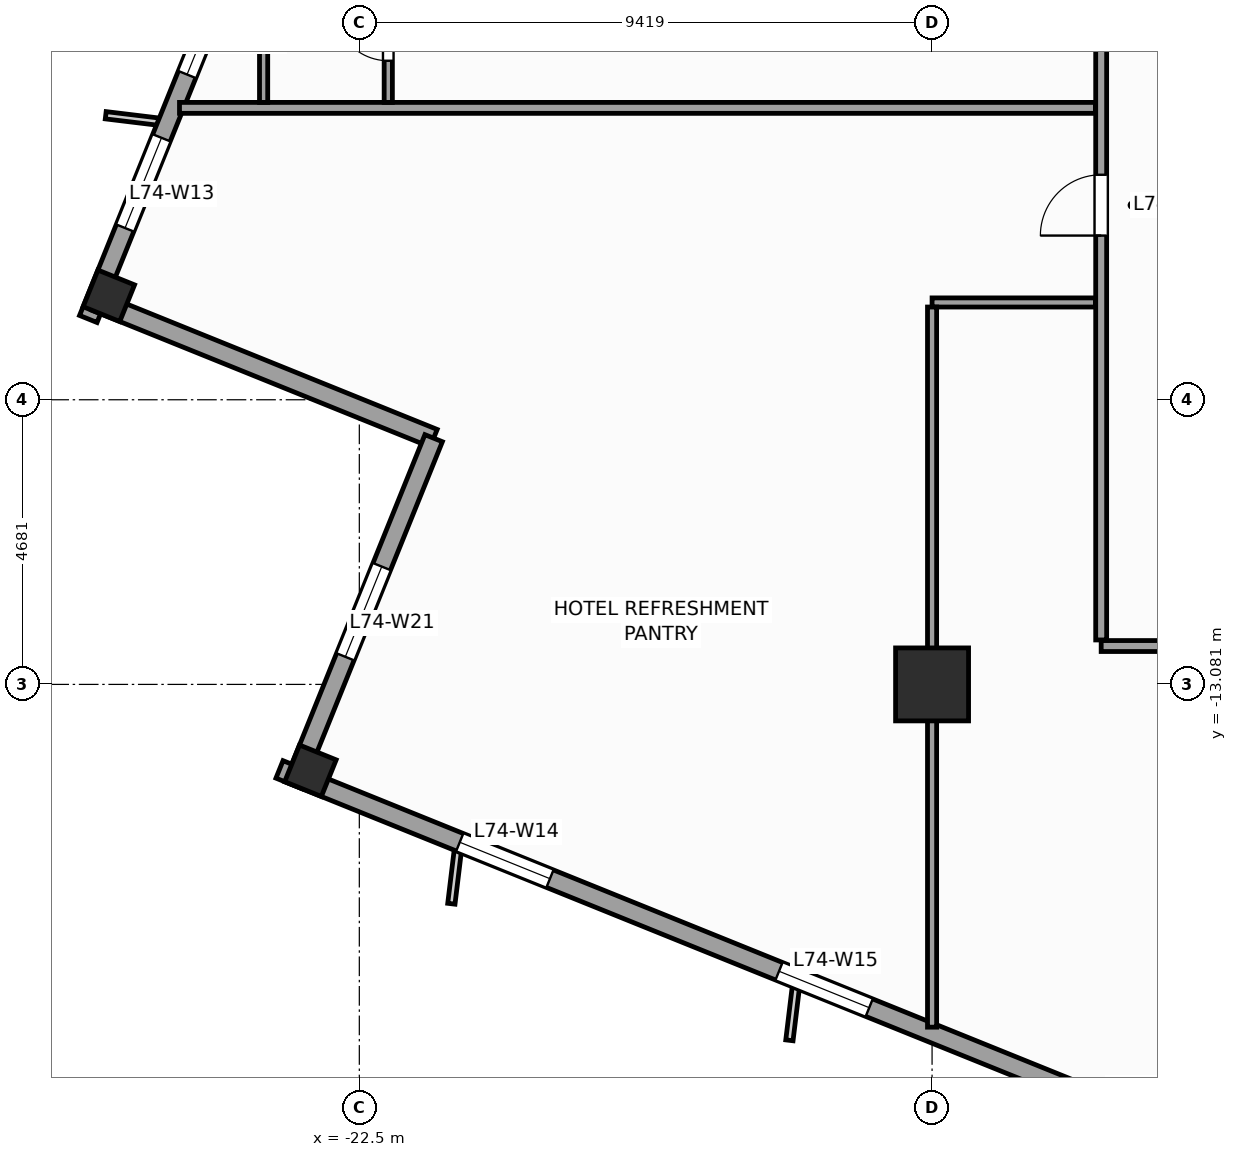
"""IFC4 building model, lengths in metres.
Left out: names, types, materials, properties, quantities, classifications, styles, units other than length and angle.
Written with IfcOpenShell. Run it as: python <this file> out.ifc"""

import sys

from ifc_helpers import new_model, si_unit, direction, frame, frame_2d, origin, origin_2d, place, context, subcontext, project, spatial, rectangle, extrude, source, transform, mapped, element, fill, save


model = new_model("IFC4")
c1 = context("Model", 3, precision=1e-05, world=origin(), true_north=direction((0.0, 1.0)))
c2 = subcontext(c1, "Body", "Model", "MODEL_VIEW")
j1 = project(units=[si_unit("LENGTHUNIT", "METRE"), si_unit("PLANEANGLEUNIT", "RADIAN")], contexts=[c1])
p1 = place(None, origin())
s1 = spatial("IfcSite", under=j1, at=p1, CompositionType="ELEMENT")
p2 = place(p1, origin())
s2 = spatial("IfcBuilding", under=s1, at=p2, CompositionType="ELEMENT")
p3 = place(p2, frame((0.0, 0.0, 301.2)))
s3 = spatial("IfcBuildingStorey", under=s2, at=p3, CompositionType="ELEMENT", Elevation=301.2)
m1 = source(origin(), c2, "Body", "SweptSolid", [
    extrude(rectangle(XDim=1.2, YDim=1.2, at=origin_2d()), origin(), (0.0, 0.0, 1.0), 3.6),
])
p4 = place(p3, frame((-13.081, -13.081, 0.0), z_axis=(0.0, 0.0, 1.0), x_axis=(1.0, 0.0, 0.0)))
e1 = element("IfcColumn", 1, at=p4, inside=s3, PredefinedType="COLUMN", context=c2, shape_type="MappedRepresentation", body=[
    mapped(m1, transform((0.0, 0.0, 0.0), scale=1.0)),
])
m2 = source(origin(), c2, "Body", "SweptSolid", [
    extrude(rectangle(XDim=0.65, YDim=0.65, at=origin_2d()), origin(), (0.0, 0.0, 1.0), 3.6),
])
for number, where, z_axis, x_axis in (
    (2, (-26.62, -6.69, 0.0), (0.0, 0.0, 1.0), (0.375, 0.927, 0.0)),
    (3, (-23.304, -14.501, 0.0), (0.0, 0.0, 1.0), (0.375, 0.927, 0.0)),
):
    element("IfcColumn", number, at=place(p3, frame(where, z_axis=z_axis, x_axis=x_axis)), inside=s3, PredefinedType="COLUMN", context=c2, shape_type="MappedRepresentation", body=[
        mapped(m2, transform((0.0, 0.0, 0.0), scale=1.0)),
    ])
p5 = place(p3, frame((-14.479, 23.813, 0.0), z_axis=(0.0, 0.0, 1.0), x_axis=(-0.374609557019, -0.927182657188, 0.0)))
e4 = element("IfcWall", 4, at=p5, inside=s3, PredefinedType="STANDARD", context=c2, shape_type="SweptSolid", body=[
    extrude(rectangle(XDim=33.31, YDim=0.31, at=frame_2d((16.655, 0.0))), origin(), (0.0, 0.0, 1.0), 2.75),
])
p6 = place(p5, frame((21.73, 0.0, 0.0)))
e5 = element("IfcOpeningElement", 5, at=p6, cuts=e4, PredefinedType="OPENING", context=c2, shape_type="SweptSolid", body=[
    extrude(rectangle(XDim=1.05, YDim=2.25, at=frame_2d((0.525, 1.125))), frame((0.0, 0.165, 0.0), z_axis=(0.0, -1.0, 0.0), x_axis=(1.0, 0.0, 0.0)), (0.0, 0.0, 1.0), 0.33),
])
p7 = place(p5, frame((3.197, 0.0, 0.47)))
e6 = element("IfcOpeningElement", 6, at=p7, cuts=e4, PredefinedType="OPENING", context=c2, shape_type="SweptSolid", body=[
    extrude(rectangle(XDim=1.6, YDim=2.1, at=frame_2d((0.8, 1.05))), frame((0.0, 0.165, 0.0), z_axis=(0.0, -1.0, 0.0), x_axis=(1.0, 0.0, 0.0)), (0.0, 0.0, 1.0), 0.33),
])
p8 = place(p5, frame((8.86, 0.0, 0.47)))
e7 = element("IfcOpeningElement", 7, at=p8, cuts=e4, PredefinedType="OPENING", context=c2, shape_type="SweptSolid", body=[
    extrude(rectangle(XDim=1.6, YDim=2.1, at=frame_2d((0.8, 1.05))), frame((0.0, 0.165, 0.0), z_axis=(0.0, -1.0, 0.0), x_axis=(1.0, 0.0, 0.0)), (0.0, 0.0, 1.0), 0.33),
])
p9 = place(p5, frame((14.439, 0.0, 0.47)))
e8 = element("IfcOpeningElement", 8, at=p9, cuts=e4, PredefinedType="OPENING", context=c2, shape_type="SweptSolid", body=[
    extrude(rectangle(XDim=1.6, YDim=2.1, at=frame_2d((0.8, 1.05))), frame((0.0, 0.165, 0.0), z_axis=(0.0, -1.0, 0.0), x_axis=(1.0, 0.0, 0.0)), (0.0, 0.0, 1.0), 0.33),
])
p10 = place(p5, frame((30.097, 0.0, 0.47)))
e9 = element("IfcOpeningElement", 9, at=p10, cuts=e4, PredefinedType="OPENING", context=c2, shape_type="SweptSolid", body=[
    extrude(rectangle(XDim=1.6, YDim=2.1, at=frame_2d((0.8, 1.05))), frame((0.0, 0.165, 0.0), z_axis=(0.0, -1.0, 0.0), x_axis=(1.0, 0.0, 0.0)), (0.0, 0.0, 1.0), 0.33),
])
p11 = place(p5, frame((27.374, 0.0, 0.47)))
e10 = element("IfcOpeningElement", 10, at=p11, cuts=e4, PredefinedType="OPENING", context=c2, shape_type="SweptSolid", body=[
    extrude(rectangle(XDim=1.6, YDim=2.1, at=frame_2d((0.8, 1.05))), frame((0.0, 0.165, 0.0), z_axis=(0.0, -1.0, 0.0), x_axis=(1.0, 0.0, 0.0)), (0.0, 0.0, 1.0), 0.33),
])
p12 = place(p3, frame((-26.841, -6.784, 0.0), z_axis=(0.0, 0.0, 1.0), x_axis=(0.927171722085, -0.374636620962, 0.0)))
e11 = element("IfcWall", 11, at=p12, inside=s3, PredefinedType="STANDARD", context=c2, shape_type="SweptSolid", body=[
    extrude(rectangle(XDim=6.0, YDim=0.31, at=frame_2d((3.0, 0.0))), origin(), (0.0, 0.0, 1.0), 2.65),
])
p13 = place(p3, frame((-21.278, -9.032, 0.0), z_axis=(0.0, 0.0, 1.0), x_axis=(-0.374602739196, -0.927185411764, 0.0)))
e12 = element("IfcWall", 12, at=p13, inside=s3, PredefinedType="STANDARD", context=c2, shape_type="SweptSolid", body=[
    extrude(rectangle(XDim=6.155, YDim=0.31, at=frame_2d((3.078, 0.0))), origin(), (0.0, 0.0, 1.0), 3.35),
])
p14 = place(p13, frame((2.278, 0.0, 0.47)))
e13 = element("IfcOpeningElement", 13, at=p14, cuts=e12, PredefinedType="OPENING", context=c2, shape_type="SweptSolid", body=[
    extrude(rectangle(XDim=1.6, YDim=2.1, at=frame_2d((0.8, 1.05))), frame((0.0, 0.165, 0.0), z_axis=(0.0, -1.0, 0.0), x_axis=(1.0, 0.0, 0.0)), (0.0, 0.0, 1.0), 0.33),
])
p15 = place(p3, frame((-23.813, -14.479, 0.0), z_axis=(0.0, 0.0, 1.0), x_axis=(0.927182657188, -0.374609557019, 0.0)))
e14 = element("IfcWall", 14, at=p15, inside=s3, PredefinedType="STANDARD", context=c2, shape_type="SweptSolid", body=[
    extrude(rectangle(XDim=33.31, YDim=0.31, at=frame_2d((16.655, 0.0))), origin(), (0.0, 0.0, 1.0), 2.75),
])
p16 = place(p15, frame((3.197, 0.0, 0.47)))
e15 = element("IfcOpeningElement", 15, at=p16, cuts=e14, PredefinedType="OPENING", context=c2, shape_type="SweptSolid", body=[
    extrude(rectangle(XDim=1.6, YDim=2.1, at=frame_2d((0.8, 1.05))), frame((0.0, 0.165, 0.0), z_axis=(0.0, -1.0, 0.0), x_axis=(1.0, 0.0, 0.0)), (0.0, 0.0, 1.0), 0.33),
])
p17 = place(p15, frame((8.86, 0.0, 0.47)))
e16 = element("IfcOpeningElement", 16, at=p17, cuts=e14, PredefinedType="OPENING", context=c2, shape_type="SweptSolid", body=[
    extrude(rectangle(XDim=1.6, YDim=2.1, at=frame_2d((0.8, 1.05))), frame((0.0, 0.165, 0.0), z_axis=(0.0, -1.0, 0.0), x_axis=(1.0, 0.0, 0.0)), (0.0, 0.0, 1.0), 0.33),
])
p18 = place(p15, frame((14.439, 0.0, 0.47)))
e17 = element("IfcOpeningElement", 17, at=p18, cuts=e14, PredefinedType="OPENING", context=c2, shape_type="SweptSolid", body=[
    extrude(rectangle(XDim=1.6, YDim=2.1, at=frame_2d((0.8, 1.05))), frame((0.0, 0.165, 0.0), z_axis=(0.0, -1.0, 0.0), x_axis=(1.0, 0.0, 0.0)), (0.0, 0.0, 1.0), 0.33),
])
p19 = place(p15, frame((22.601, 0.0, 0.47)))
e18 = element("IfcOpeningElement", 18, at=p19, cuts=e14, PredefinedType="OPENING", context=c2, shape_type="SweptSolid", body=[
    extrude(rectangle(XDim=1.6, YDim=2.1, at=frame_2d((0.8, 1.05))), frame((0.0, 0.165, 0.0), z_axis=(0.0, -1.0, 0.0), x_axis=(1.0, 0.0, 0.0)), (0.0, 0.0, 1.0), 0.33),
])
p20 = place(p15, frame((27.097, 0.0, 0.47)))
e19 = element("IfcOpeningElement", 19, at=p20, cuts=e14, PredefinedType="OPENING", context=c2, shape_type="SweptSolid", body=[
    extrude(rectangle(XDim=1.6, YDim=2.1, at=frame_2d((0.8, 1.05))), frame((0.0, 0.165, 0.0), z_axis=(0.0, -1.0, 0.0), x_axis=(1.0, 0.0, 0.0)), (0.0, 0.0, 1.0), 0.33),
])
p21 = place(p3, frame((-10.3, -12.45, 0.0), z_axis=(0.0, 0.0, 1.0), x_axis=(1.0, 0.0, 0.0)))
e20 = element("IfcWall", 20, at=p21, inside=s3, PredefinedType="PARTITIONING", context=c2, shape_type="SweptSolid", body=[
    extrude(rectangle(XDim=21.65, YDim=0.18, at=frame_2d((10.825, 0.0))), origin(), (0.0, 0.0, 1.0), 3.35),
])
p22 = place(p21, frame((14.786, 0.0, 0.0)))
e21 = element("IfcOpeningElement", 21, at=p22, cuts=e20, PredefinedType="OPENING", context=c2, shape_type="SweptSolid", body=[
    extrude(rectangle(XDim=0.95, YDim=2.1, at=frame_2d((0.475, 1.05))), frame((0.0, 0.1, 0.0), z_axis=(0.0, -1.0, 0.0), x_axis=(1.0, 0.0, 0.0)), (0.0, 0.0, 1.0), 0.2),
])
p23 = place(p21, frame((9.8, 0.0, 0.0)))
e22 = element("IfcOpeningElement", 22, at=p23, cuts=e20, PredefinedType="OPENING", context=c2, shape_type="SweptSolid", body=[
    extrude(rectangle(XDim=1.0, YDim=2.15, at=frame_2d((0.5, 1.075))), frame((0.0, 0.1, 0.0), z_axis=(0.0, -1.0, 0.0), x_axis=(1.0, 0.0, 0.0)), (0.0, 0.0, 1.0), 0.2),
])
p24 = place(p21, frame((3.064, 0.0, 0.0)))
e23 = element("IfcOpeningElement", 23, at=p24, cuts=e20, PredefinedType="OPENING", context=c2, shape_type="SweptSolid", body=[
    extrude(rectangle(XDim=1.0, YDim=2.15, at=frame_2d((0.5, 1.075))), frame((0.0, 0.1, 0.0), z_axis=(0.0, -1.0, 0.0), x_axis=(1.0, 0.0, 0.0)), (0.0, 0.0, 1.0), 0.2),
])
p25 = place(p3, frame((-10.3, -12.35, 0.0), z_axis=(0.0, 0.0, 1.0), x_axis=(0.0, 1.0, 0.0)))
e24 = element("IfcWall", 24, at=p25, inside=s3, PredefinedType="PARTITIONING", context=c2, shape_type="SweptSolid", body=[
    extrude(rectangle(XDim=22.55, YDim=0.18, at=frame_2d((11.275, 0.0))), origin(), (0.0, 0.0, 1.0), 3.35),
])
p26 = place(p25, frame((13.95, 0.0, 0.0)))
e25 = element("IfcOpeningElement", 25, at=p26, cuts=e24, PredefinedType="OPENING", context=c2, shape_type="SweptSolid", body=[
    extrude(rectangle(XDim=1.0, YDim=2.15, at=frame_2d((0.5, 1.075))), frame((0.0, 0.1, 0.0), z_axis=(0.0, -1.0, 0.0), x_axis=(1.0, 0.0, 0.0)), (0.0, 0.0, 1.0), 0.2),
])
p27 = place(p25, frame((17.25, 0.0, 0.0)))
e26 = element("IfcOpeningElement", 26, at=p27, cuts=e24, PredefinedType="OPENING", context=c2, shape_type="SweptSolid", body=[
    extrude(rectangle(XDim=1.0, YDim=2.15, at=frame_2d((0.5, 1.075))), frame((0.0, 0.1, 0.0), z_axis=(0.0, -1.0, 0.0), x_axis=(1.0, 0.0, 0.0)), (0.0, 0.0, 1.0), 0.2),
])
p28 = place(p25, frame((6.65, 0.0, 0.0)))
e27 = element("IfcOpeningElement", 27, at=p28, cuts=e24, PredefinedType="OPENING", context=c2, shape_type="SweptSolid", body=[
    extrude(rectangle(XDim=1.0, YDim=2.15, at=frame_2d((0.5, 1.075))), frame((0.0, 0.1, 0.0), z_axis=(0.0, -1.0, 0.0), x_axis=(1.0, 0.0, 0.0)), (0.0, 0.0, 1.0), 0.2),
])
p29 = place(p25, frame((10.15, 0.0, 0.0)))
e28 = element("IfcOpeningElement", 28, at=p29, cuts=e24, PredefinedType="OPENING", context=c2, shape_type="SweptSolid", body=[
    extrude(rectangle(XDim=1.0, YDim=2.15, at=frame_2d((0.5, 1.075))), frame((0.0, 0.1, 0.0), z_axis=(0.0, -1.0, 0.0), x_axis=(1.0, 0.0, 0.0)), (0.0, 0.0, 1.0), 0.2),
])
p30 = place(p3, frame((-10.395, -3.6, 0.0), z_axis=(0.0, 0.0, 1.0), x_axis=(-1.0, 0.0, 0.0)))
e29 = element("IfcWall", 29, at=p30, inside=s3, PredefinedType="PARTITIONING", context=c2, shape_type="SweptSolid", body=[
    extrude(rectangle(XDim=15.062, YDim=0.18, at=frame_2d((7.531, 0.0))), origin(), (0.0, 0.0, 1.0), 3.35),
])
p31 = place(p3, frame((-10.395, -6.8, 0.0), z_axis=(0.0, 0.0, 1.0), x_axis=(-1.0, 0.0, 0.0)))
e30 = element("IfcWall", 30, at=p31, inside=s3, PredefinedType="PARTITIONING", context=c2, shape_type="SweptSolid", body=[
    extrude(rectangle(XDim=2.686, YDim=0.15, at=frame_2d((1.343, 0.0))), origin(), (0.0, 0.0, 1.0), 3.35),
])
p32 = place(p3, frame((-13.081, -6.875, 0.0), z_axis=(0.0, 0.0, 1.0), x_axis=(0.0, -1.0, 0.0)))
e31 = element("IfcWall", 31, at=p32, inside=s3, PredefinedType="PARTITIONING", context=c2, shape_type="SweptSolid", body=[
    extrude(rectangle(XDim=11.843, YDim=0.15, at=frame_2d((5.921, 0.0))), origin(), (0.0, 0.0, 1.0), 2.45),
])
p33 = place(p3, frame((-22.024, -3.51, 0.0), z_axis=(0.0, 0.0, 1.0), x_axis=(0.0, 1.0, 0.0)))
e32 = element("IfcWall", 32, at=p33, inside=s3, PredefinedType="PARTITIONING", context=c2, shape_type="SweptSolid", body=[
    extrude(rectangle(XDim=2.25, YDim=0.135, at=frame_2d((1.125, 0.0))), origin(), (0.0, 0.0, 1.0), 3.35),
])
p34 = place(p33, frame((0.685, 0.0, 0.0)))
e33 = element("IfcOpeningElement", 33, at=p34, cuts=e32, PredefinedType="OPENING", context=c2, shape_type="SweptSolid", body=[
    extrude(rectangle(XDim=0.88, YDim=2.1, at=frame_2d((0.44, 1.05))), frame((0.0, 0.078, 0.0), z_axis=(0.0, -1.0, 0.0), x_axis=(1.0, 0.0, 0.0)), (0.0, 0.0, 1.0), 0.155),
])
p35 = place(p3, frame((-24.074, -3.51, 0.0), z_axis=(0.0, 0.0, 1.0), x_axis=(0.0, 1.0, 0.0)))
e34 = element("IfcWall", 34, at=p35, inside=s3, PredefinedType="PARTITIONING", context=c2, shape_type="SweptSolid", body=[
    extrude(rectangle(XDim=2.25, YDim=0.135, at=frame_2d((1.125, 0.0))), origin(), (0.0, 0.0, 1.0), 3.35),
])
m3 = source(origin(), c2, "Body", "SweptSolid", [
    extrude(rectangle(XDim=1.6, YDim=2.1, at=frame_2d((0.8, 1.05))), frame((0.0, 0.03, 0.0), z_axis=(0.0, -1.0, 0.0), x_axis=(1.0, 0.0, 0.0)), (0.0, 0.0, 1.0), 0.06),
])
p36 = place(p10, origin())
e35 = element("IfcWindow", 35, at=p36, inside=s3, PartitioningType="SINGLE_PANEL", PredefinedType="WINDOW", context=c2, shape_type="MappedRepresentation", body=[
    mapped(m3, transform((0.0, 0.0, 0.0), scale=1.0)),
])
fill(e9, e35)
p37 = place(p16, origin())
e36 = element("IfcWindow", 36, at=p37, inside=s3, PartitioningType="SINGLE_PANEL", PredefinedType="WINDOW", context=c2, shape_type="MappedRepresentation", body=[
    mapped(m3, transform((0.0, 0.0, 0.0), scale=1.0)),
])
fill(e15, e36)
p38 = place(p17, origin())
e37 = element("IfcWindow", 37, at=p38, inside=s3, PartitioningType="SINGLE_PANEL", PredefinedType="WINDOW", context=c2, shape_type="MappedRepresentation", body=[
    mapped(m3, transform((0.0, 0.0, 0.0), scale=1.0)),
])
fill(e16, e37)
p39 = place(p14, origin())
e38 = element("IfcWindow", 38, at=p39, inside=s3, PartitioningType="SINGLE_PANEL", PredefinedType="WINDOW", context=c2, shape_type="MappedRepresentation", body=[
    mapped(m3, transform((0.0, 0.0, 0.0), scale=1.0)),
])
fill(e13, e38)
m4 = source(origin(), c2, "Body", "SweptSolid", [
    extrude(rectangle(XDim=1.0, YDim=2.15, at=frame_2d((0.5, 1.075))), frame((0.0, 0.025, 0.0), z_axis=(0.0, -1.0, 0.0), x_axis=(1.0, 0.0, 0.0)), (0.0, 0.0, 1.0), 0.05),
])
p40 = place(p28, origin())
e39 = element("IfcDoor", 39, at=p40, inside=s3, OperationType="SINGLE_SWING_LEFT", PredefinedType="DOOR", context=c2, shape_type="MappedRepresentation", body=[
    mapped(m4, transform((0.0, 0.0, 0.0), scale=1.0)),
])
fill(e27, e39)
m5 = source(origin(), c2, "Body", "SweptSolid", [
    extrude(rectangle(XDim=0.88, YDim=2.1, at=frame_2d((0.44, 1.05))), frame((0.0, 0.025, 0.0), z_axis=(0.0, -1.0, 0.0), x_axis=(1.0, 0.0, 0.0)), (0.0, 0.0, 1.0), 0.05),
])
p41 = place(p34, origin())
e40 = element("IfcDoor", 40, at=p41, inside=s3, OperationType="SINGLE_SWING_RIGHT", PredefinedType="DOOR", context=c2, shape_type="MappedRepresentation", body=[
    mapped(m5, transform((0.0, 0.0, 0.0), scale=1.0)),
])
fill(e33, e40)
p42 = place(p11, origin())
e41 = element("IfcWindow", 41, at=p42, inside=s3, PartitioningType="SINGLE_PANEL", PredefinedType="WINDOW", context=c2, shape_type="MappedRepresentation", body=[
    mapped(m3, transform((0.0, 0.0, 0.0), scale=1.0)),
])
fill(e10, e41)
save(model, sys.argv[1])
